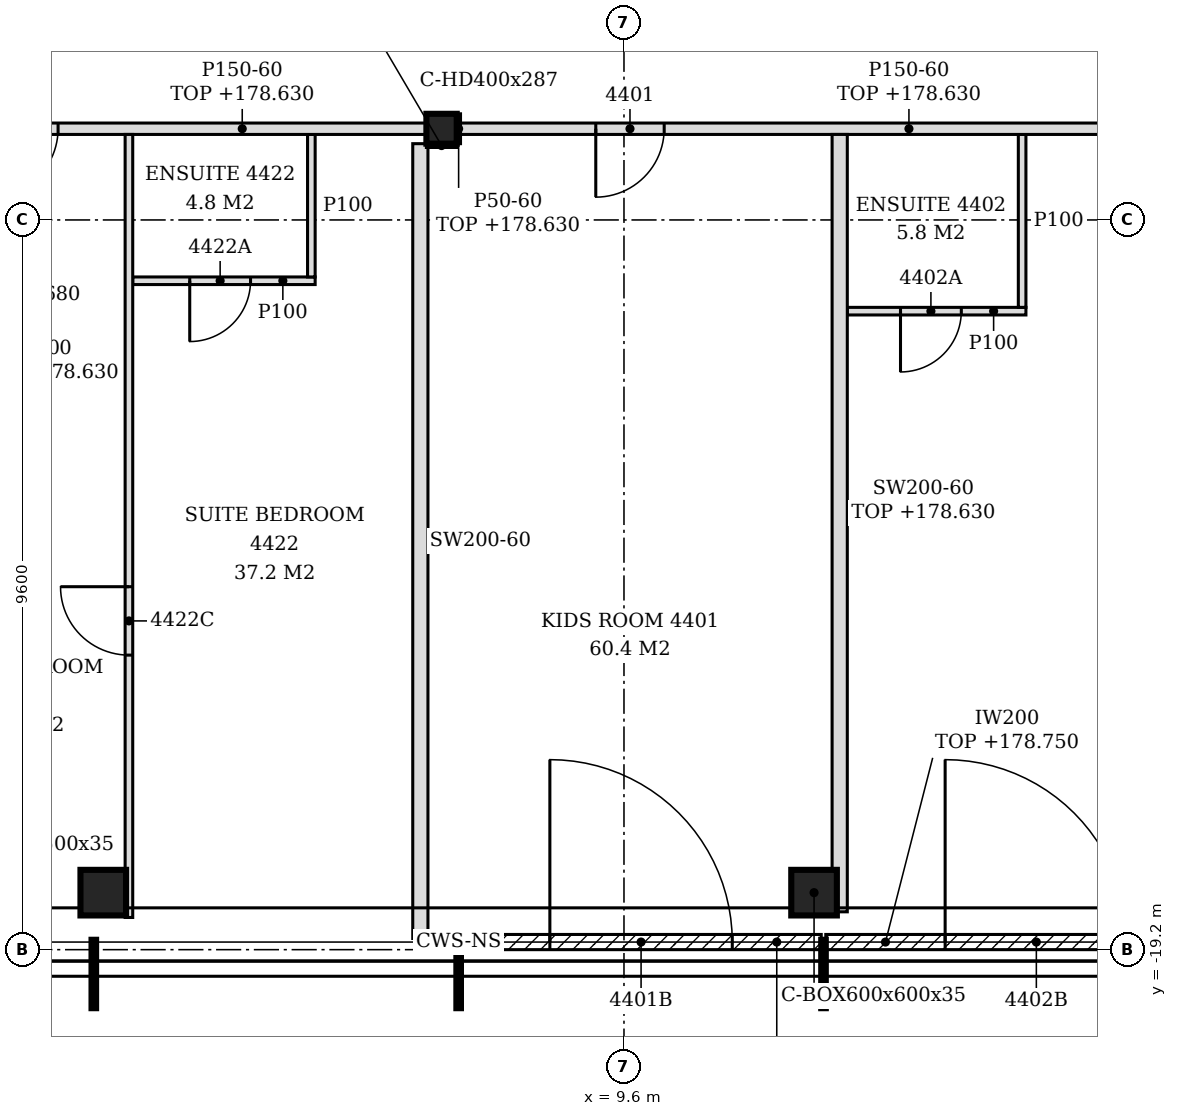
"""IFC4 building model, lengths in metres.
Left out: names, types, materials, properties, quantities, classifications, styles, units other than length and angle.
Written with IfcOpenShell. Run it as: python <this file> out.ifc"""

import sys

from ifc_helpers import new_model, si_unit, direction, frame, frame_2d, origin, origin_2d, place, context, subcontext, project, spatial, polyline, rectangle, hollow_rectangle, i_section, outline, extrude, clip, halfspace, element, fill, save


model = new_model("IFC4")
c1 = context("Model", 3, precision=1e-05, world=origin(), true_north=direction((0.0, 1.0)))
c2 = subcontext(c1, "Body", "Model", "MODEL_VIEW")
j1 = project(units=[si_unit("LENGTHUNIT", "METRE"), si_unit("PLANEANGLEUNIT", "RADIAN")], contexts=[c1])
p1 = place(None, origin())
s1 = spatial("IfcSite", under=j1, at=p1, CompositionType="ELEMENT")
p2 = place(p1, origin())
s2 = spatial("IfcBuilding", under=s1, at=p2, CompositionType="ELEMENT")
p3 = place(p2, frame((0.0, 0.0, 175.8)))
s3 = spatial("IfcBuildingStorey", under=s2, at=p3, CompositionType="ELEMENT", Elevation=175.8)
for number, where, z_axis, x_axis in (
    (1, (2.749, -18.45, -0.15), (0.183, -0.122, 0.976), (0.555, 0.832, 0.0)),
    (2, (12.101, -18.45, -0.15), (0.183, -0.122, 0.976), (0.555, 0.832, 0.0)),
):
    element("IfcColumn", number, at=place(p3, frame(where, z_axis=z_axis, x_axis=x_axis)), inside=s3, PredefinedType="COLUMN", context=c2, shape_type="Clipping", body=[
        clip(clip(extrude(hollow_rectangle(XDim=0.6, YDim=0.6, WallThickness=0.035, at=origin_2d()), origin(), (0.0, 0.0, 1.0), 3.69), halfspace(frame((0.0, 0.0, 0.022), z_axis=(0.0, 0.0, 1.0), x_axis=(1.0, 0.0, 0.0)), True)), halfspace(frame((0.0, 0.0, 3.67), z_axis=(0.0, 0.0, 1.0), x_axis=(1.0, 0.0, 0.0)), False)),
    ])
p4 = place(p3, frame((7.2, -8.4, -0.15), z_axis=(0.0, 0.0, 1.0), x_axis=(1.0, 0.0, 0.0)))
e3 = element("IfcColumn", 3, at=p4, inside=s3, PredefinedType="COLUMN", context=c2, shape_type="SweptSolid", body=[
    extrude(i_section(OverallWidth=0.399, OverallDepth=0.393, WebThickness=0.023, FlangeThickness=0.037, FilletRadius=0.015, at=origin_2d()), origin(), (0.0, 0.0, 1.0), 3.6),
])
p5 = place(p3, frame((7.455, -19.1, 0.0), z_axis=(0.0, 0.0, 1.0), x_axis=(1.0, 0.0, 0.0)))
e4 = element("IfcWall", 4, at=p5, inside=s3, PredefinedType="NOTDEFINED", context=c2, shape_type="SweptSolid", body=[
    extrude(rectangle(XDim=4.74, YDim=0.2, at=frame_2d((2.37, 0.0))), origin(), (0.0, 0.0, 1.0), 2.95),
])
p6 = place(p5, frame((1.17, 0.0, 0.0)))
e5 = element("IfcOpeningElement", 5, at=p6, cuts=e4, PredefinedType="OPENING", context=c2, shape_type="SweptSolid", body=[
    extrude(rectangle(XDim=2.4, YDim=2.4, at=frame_2d((1.2, 1.2))), frame((0.0, 0.11, 0.0), z_axis=(0.0, -1.0, 0.0), x_axis=(1.0, 0.0, 0.0)), (0.0, 0.0, 1.0), 0.22),
])
p7 = place(p3, frame((12.255, -19.1, 0.0), z_axis=(0.0, 0.0, 1.0), x_axis=(1.0, 0.0, 0.0)))
e6 = element("IfcWall", 6, at=p7, inside=s3, PredefinedType="NOTDEFINED", context=c2, shape_type="SweptSolid", body=[
    extrude(rectangle(XDim=4.74, YDim=0.2, at=frame_2d((2.37, 0.0))), origin(), (0.0, 0.0, 1.0), 2.95),
])
p8 = place(p7, frame((1.57, 0.0, 0.0)))
e7 = element("IfcOpeningElement", 7, at=p8, cuts=e6, PredefinedType="OPENING", context=c2, shape_type="SweptSolid", body=[
    extrude(rectangle(XDim=2.4, YDim=2.4, at=frame_2d((1.2, 1.2))), frame((0.0, 0.11, 0.0), z_axis=(0.0, -1.0, 0.0), x_axis=(1.0, 0.0, 0.0)), (0.0, 0.0, 1.0), 0.22),
])
p9 = place(p3, frame((6.921, -19.053, 0.0), z_axis=(0.0, 0.0, 1.0), x_axis=(0.0, 1.0, 0.0)))
e8 = element("IfcWall", 8, at=p9, inside=s3, PredefinedType="PARTITIONING", context=c2, shape_type="SweptSolid", body=[
    extrude(outline(polyline([(0.0, 0.0), (10.457, 0.0), (10.457, 3.45), (8.958, 3.45), (8.956, 2.88), (8.748, 2.88), (8.746, 3.45), (4.158, 3.45), (4.156, 2.88), (3.948, 2.88), (3.946, 3.45), (0.303, 3.45), (0.301, 2.93), (0.003, 2.93), (0.001, 3.45), (0.0, 3.45), (0.0, 0.0)])), frame((0.0, 0.1, 0.0), z_axis=(0.0, -1.0, 0.0), x_axis=(1.0, 0.0, 0.0)), (0.0, 0.0, 1.0), 0.2),
])
p10 = place(p3, frame((3.087, -18.777, 0.0), z_axis=(0.0, 0.0, 1.0), x_axis=(0.0, 1.0, 0.0)))
e9 = element("IfcWall", 9, at=p10, inside=s3, PredefinedType="PARTITIONING", context=c2, shape_type="SweptSolid", body=[
    extrude(outline(polyline([(0.495, 0.0), (10.302, 0.0), (10.302, 0.863), (10.302, 1.725), (10.302, 2.587), (10.302, 2.83), (0.252, 2.83), (0.35, 2.587), (0.495, 1.725), (0.495, 0.863), (0.495, 0.0)])), frame((0.0, 0.05, 0.0), z_axis=(0.0, -1.0, 0.0), x_axis=(1.0, 0.0, 0.0)), (0.0, 0.0, 1.0), 0.1),
])
p11 = place(p10, frame((3.452, 0.0, 0.0)))
e10 = element("IfcOpeningElement", 10, at=p11, cuts=e9, PredefinedType="OPENING", context=c2, shape_type="SweptSolid", body=[
    extrude(rectangle(XDim=0.9, YDim=2.1, at=frame_2d((0.45, 1.05))), frame((0.0, 0.06, 0.0), z_axis=(0.0, -1.0, 0.0), x_axis=(1.0, 0.0, 0.0)), (0.0, 0.0, 1.0), 0.12),
])
p12 = place(p3, frame((12.438, -18.702, 0.0), z_axis=(0.0, 0.0, 1.0), x_axis=(0.0, 1.0, 0.0)))
e11 = element("IfcWall", 11, at=p12, inside=s3, PredefinedType="PARTITIONING", context=c2, shape_type="SweptSolid", body=[
    extrude(outline(polyline([(0.455, 0.0), (10.227, 0.0), (10.227, 0.863), (10.227, 1.725), (10.227, 2.587), (10.227, 2.83), (0.237, 2.83), (0.33, 2.587), (0.438, 1.725), (0.455, 0.863), (0.455, 0.0)])), frame((0.0, 0.1, 0.0), z_axis=(0.0, -1.0, 0.0), x_axis=(1.0, 0.0, 0.0)), (0.0, 0.0, 1.0), 0.2),
])
p13 = place(p3, frame((12.538, -10.8, 0.0), z_axis=(0.0, 0.0, 1.0), x_axis=(1.0, 0.0, 0.0)))
e12 = element("IfcWall", 12, at=p13, inside=s3, PredefinedType="PARTITIONING", context=c2, shape_type="SweptSolid", body=[
    extrude(rectangle(XDim=2.35, YDim=0.1, at=frame_2d((1.175, 0.0))), origin(), (0.0, 0.0, 1.0), 3.45),
])
p14 = place(p13, frame((0.7, 0.0, 0.0)))
e13 = element("IfcOpeningElement", 13, at=p14, cuts=e12, PredefinedType="OPENING", context=c2, shape_type="SweptSolid", body=[
    extrude(rectangle(XDim=0.8, YDim=2.1, at=frame_2d((0.4, 1.05))), frame((0.0, 0.06, 0.0), z_axis=(0.0, -1.0, 0.0), x_axis=(1.0, 0.0, 0.0)), (0.0, 0.0, 1.0), 0.12),
])
p15 = place(p3, frame((14.838, -10.75, 0.0), z_axis=(0.0, 0.0, 1.0), x_axis=(0.0, 1.0, 0.0)))
e14 = element("IfcWall", 14, at=p15, inside=s3, PredefinedType="PARTITIONING", context=c2, shape_type="SweptSolid", body=[
    extrude(outline(polyline([(0.0, 0.0), (2.275, 0.0), (2.275, 2.83), (2.2, 2.83), (2.198, 3.45), (0.655, 3.45), (0.653, 2.88), (0.445, 2.88), (0.443, 3.45), (0.0, 3.45), (0.0, 0.0)])), frame((0.0, 0.05, 0.0), z_axis=(0.0, -1.0, 0.0), x_axis=(1.0, 0.0, 0.0)), (0.0, 0.0, 1.0), 0.1),
])
p16 = place(p3, frame((3.137, -10.4, 0.0), z_axis=(0.0, 0.0, 1.0), x_axis=(1.0, 0.0, 0.0)))
e15 = element("IfcWall", 15, at=p16, inside=s3, PredefinedType="PARTITIONING", context=c2, shape_type="SweptSolid", body=[
    extrude(rectangle(XDim=2.4, YDim=0.1, at=frame_2d((1.2, 0.0))), origin(), (0.0, 0.0, 1.0), 3.45),
])
p17 = place(p16, frame((0.75, 0.0, 0.0)))
e16 = element("IfcOpeningElement", 16, at=p17, cuts=e15, PredefinedType="OPENING", context=c2, shape_type="SweptSolid", body=[
    extrude(rectangle(XDim=0.8, YDim=2.1, at=frame_2d((0.4, 1.05))), frame((0.0, 0.06, 0.0), z_axis=(0.0, -1.0, 0.0), x_axis=(1.0, 0.0, 0.0)), (0.0, 0.0, 1.0), 0.12),
])
p18 = place(p3, frame((5.487, -10.35, 0.0), z_axis=(0.0, 0.0, 1.0), x_axis=(0.0, 1.0, 0.0)))
e17 = element("IfcWall", 17, at=p18, inside=s3, PredefinedType="PARTITIONING", context=c2, shape_type="SweptSolid", body=[
    extrude(outline(polyline([(0.0, 0.0), (1.875, 0.0), (1.875, 2.83), (1.8, 2.83), (1.798, 3.45), (0.255, 3.45), (0.253, 2.88), (0.045, 2.88), (0.043, 3.45), (0.0, 3.45), (0.0, 0.0)])), frame((0.0, 0.05, 0.0), z_axis=(0.0, -1.0, 0.0), x_axis=(1.0, 0.0, 0.0)), (0.0, 0.0, 1.0), 0.1),
])
p19 = place(p3, frame((-4.601, -8.4, 0.0), z_axis=(0.0, 0.0, 1.0), x_axis=(1.0, 0.0, 0.0)))
e18 = element("IfcWall", 18, at=p19, inside=s3, PredefinedType="PARTITIONING", context=c2, shape_type="SweptSolid", body=[
    extrude(rectangle(XDim=11.601, YDim=0.15, at=frame_2d((5.801, 0.0))), origin(), (0.0, 0.0, 1.0), 2.83),
])
p20 = place(p19, frame((0.531, 0.0, 0.0)))
e19 = element("IfcOpeningElement", 19, at=p20, cuts=e18, PredefinedType="OPENING", context=c2, shape_type="SweptSolid", body=[
    extrude(rectangle(XDim=0.9, YDim=2.1, at=frame_2d((0.45, 1.05))), frame((0.0, 0.085, 0.0), z_axis=(0.0, -1.0, 0.0), x_axis=(1.0, 0.0, 0.0)), (0.0, 0.0, 1.0), 0.17),
])
p21 = place(p19, frame((3.093, 0.0, 0.0)))
e20 = element("IfcOpeningElement", 20, at=p21, cuts=e18, PredefinedType="OPENING", context=c2, shape_type="SweptSolid", body=[
    extrude(rectangle(XDim=0.9, YDim=2.1, at=frame_2d((0.45, 1.05))), frame((0.0, 0.085, 0.0), z_axis=(0.0, -1.0, 0.0), x_axis=(1.0, 0.0, 0.0)), (0.0, 0.0, 1.0), 0.17),
])
p22 = place(p19, frame((5.855, 0.0, 0.0)))
e21 = element("IfcOpeningElement", 21, at=p22, cuts=e18, PredefinedType="OPENING", context=c2, shape_type="SweptSolid", body=[
    extrude(rectangle(XDim=0.9, YDim=2.1, at=frame_2d((0.45, 1.05))), frame((0.0, 0.085, 0.0), z_axis=(0.0, -1.0, 0.0), x_axis=(1.0, 0.0, 0.0)), (0.0, 0.0, 1.0), 0.17),
])
p23 = place(p3, frame((7.399, -8.4, 0.0), z_axis=(0.0, 0.0, 1.0), x_axis=(1.0, 0.0, 0.0)))
e22 = element("IfcWall", 22, at=p23, inside=s3, PredefinedType="PARTITIONING", context=c2, shape_type="SweptSolid", body=[
    extrude(rectangle(XDim=11.601, YDim=0.15, at=frame_2d((5.801, 0.0))), origin(), (0.0, 0.0, 1.0), 2.83),
])
p24 = place(p23, frame((1.829, 0.0, 0.0)))
e23 = element("IfcOpeningElement", 23, at=p24, cuts=e22, PredefinedType="OPENING", context=c2, shape_type="SweptSolid", body=[
    extrude(rectangle(XDim=0.9, YDim=2.1, at=frame_2d((0.45, 1.05))), frame((0.0, 0.085, 0.0), z_axis=(0.0, -1.0, 0.0), x_axis=(1.0, 0.0, 0.0)), (0.0, 0.0, 1.0), 0.17),
])
p25 = place(p23, frame((9.169, 0.0, 0.0)))
e24 = element("IfcOpeningElement", 24, at=p25, cuts=e22, PredefinedType="OPENING", context=c2, shape_type="SweptSolid", body=[
    extrude(rectangle(XDim=0.9, YDim=2.1, at=frame_2d((0.45, 1.05))), frame((0.0, 0.085, 0.0), z_axis=(0.0, -1.0, 0.0), x_axis=(1.0, 0.0, 0.0)), (0.0, 0.0, 1.0), 0.17),
])
p26 = place(p3, frame((7.425, -8.596, 0.0), z_axis=(0.0, 0.0, 1.0), x_axis=(0.0, 1.0, 0.0)))
e25 = element("IfcWall", 25, at=p26, inside=s3, PredefinedType="PARTITIONING", context=c2, shape_type="SweptSolid", body=[
    extrude(rectangle(XDim=0.393, YDim=0.05, at=frame_2d((0.196, 0.0))), origin(), (0.0, 0.0, 1.0), 2.83),
])
p27 = place(p3, frame((7.0, -8.622, 0.0), z_axis=(0.0, 0.0, 1.0), x_axis=(1.0, 0.0, 0.0)))
e26 = element("IfcWall", 26, at=p27, inside=s3, PredefinedType="PARTITIONING", context=c2, shape_type="SweptSolid", body=[
    extrude(rectangle(XDim=0.399, YDim=0.05, at=frame_2d((0.199, 0.0))), origin(), (0.0, 0.0, 1.0), 2.83),
])
p28 = place(p6, origin())
e27 = element("IfcDoor", 27, at=p28, inside=s3, OperationType="SINGLE_SWING_LEFT", PredefinedType="DOOR", context=c2, shape_type="SweptSolid", body=[
    extrude(rectangle(XDim=2.4, YDim=2.4, at=frame_2d((1.2, 1.2))), frame((0.0, 0.025, 0.0), z_axis=(0.0, -1.0, 0.0), x_axis=(1.0, 0.0, 0.0)), (0.0, 0.0, 1.0), 0.05),
])
fill(e5, e27)
p29 = place(p8, origin())
e28 = element("IfcDoor", 28, at=p29, inside=s3, OperationType="SINGLE_SWING_LEFT", PredefinedType="DOOR", context=c2, shape_type="SweptSolid", body=[
    extrude(rectangle(XDim=2.4, YDim=2.4, at=frame_2d((1.2, 1.2))), frame((0.0, 0.025, 0.0), z_axis=(0.0, -1.0, 0.0), x_axis=(1.0, 0.0, 0.0)), (0.0, 0.0, 1.0), 0.05),
])
fill(e7, e28)
p30 = place(p24, frame((0.9, 0.0, 0.0), z_axis=(0.0, 0.0, 1.0), x_axis=(-1.0, 0.0, 0.0)))
e29 = element("IfcDoor", 29, at=p30, inside=s3, OperationType="SINGLE_SWING_RIGHT", PredefinedType="DOOR", context=c2, shape_type="SweptSolid", body=[
    extrude(rectangle(XDim=0.9, YDim=2.1, at=frame_2d((0.45, 1.05))), frame((0.0, 0.025, 0.0), z_axis=(0.0, -1.0, 0.0), x_axis=(1.0, 0.0, 0.0)), (0.0, 0.0, 1.0), 0.05),
])
fill(e23, e29)
p31 = place(p14, frame((0.8, 0.0, 0.0), z_axis=(0.0, 0.0, 1.0), x_axis=(-1.0, 0.0, 0.0)))
e30 = element("IfcDoor", 30, at=p31, inside=s3, OperationType="SINGLE_SWING_RIGHT", PredefinedType="DOOR", context=c2, shape_type="SweptSolid", body=[
    extrude(rectangle(XDim=0.8, YDim=2.1, at=frame_2d((0.4, 1.05))), frame((0.0, 0.025, 0.0), z_axis=(0.0, -1.0, 0.0), x_axis=(1.0, 0.0, 0.0)), (0.0, 0.0, 1.0), 0.05),
])
fill(e13, e30)
p32 = place(p22, frame((0.9, 0.0, 0.0), z_axis=(0.0, 0.0, 1.0), x_axis=(-1.0, 0.0, 0.0)))
e31 = element("IfcDoor", 31, at=p32, inside=s3, OperationType="SINGLE_SWING_RIGHT", PredefinedType="DOOR", context=c2, shape_type="SweptSolid", body=[
    extrude(rectangle(XDim=0.9, YDim=2.1, at=frame_2d((0.45, 1.05))), frame((0.0, 0.025, 0.0), z_axis=(0.0, -1.0, 0.0), x_axis=(1.0, 0.0, 0.0)), (0.0, 0.0, 1.0), 0.05),
])
fill(e21, e31)
p33 = place(p11, origin())
e32 = element("IfcDoor", 32, at=p33, inside=s3, OperationType="SINGLE_SWING_RIGHT", PredefinedType="DOOR", context=c2, shape_type="SweptSolid", body=[
    extrude(rectangle(XDim=0.9, YDim=2.1, at=frame_2d((0.45, 1.05))), frame((0.0, 0.025, 0.0), z_axis=(0.0, -1.0, 0.0), x_axis=(1.0, 0.0, 0.0)), (0.0, 0.0, 1.0), 0.05),
])
fill(e10, e32)
p34 = place(p17, frame((0.8, 0.0, 0.0), z_axis=(0.0, 0.0, 1.0), x_axis=(-1.0, 0.0, 0.0)))
e33 = element("IfcDoor", 33, at=p34, inside=s3, OperationType="SINGLE_SWING_RIGHT", PredefinedType="DOOR", context=c2, shape_type="SweptSolid", body=[
    extrude(rectangle(XDim=0.8, YDim=2.1, at=frame_2d((0.4, 1.05))), frame((0.0, 0.025, 0.0), z_axis=(0.0, -1.0, 0.0), x_axis=(1.0, 0.0, 0.0)), (0.0, 0.0, 1.0), 0.05),
])
fill(e16, e33)
save(model, sys.argv[1])
